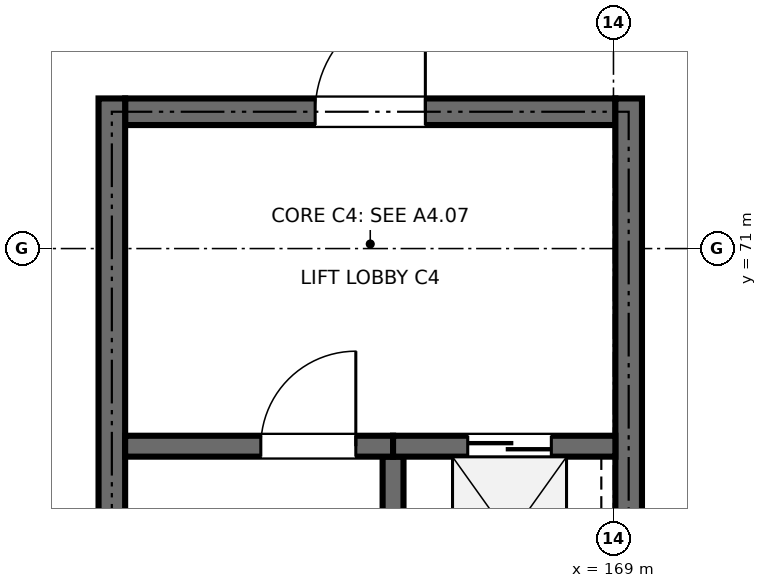
"""IFC4 building model, lengths in metres.
Left out: names, types, materials, properties, quantities, classifications, styles, units other than length and angle.
Written with IfcOpenShell. Run it as: python <this file> out.ifc"""

import sys

from ifc_helpers import new_model, si_unit, direction, frame, frame_2d, origin, place, context, subcontext, project, spatial, rectangle, extrude, element, fill, save


model = new_model("IFC4")
c1 = context("Model", 3, precision=1e-05, world=origin(), true_north=direction((0.0, 1.0)))
c2 = subcontext(c1, "Body", "Model", "MODEL_VIEW")
j1 = project(units=[si_unit("LENGTHUNIT", "METRE"), si_unit("PLANEANGLEUNIT", "RADIAN")], contexts=[c1])
p1 = place(None, origin())
s1 = spatial("IfcSite", under=j1, at=p1, CompositionType="ELEMENT")
p2 = place(p1, origin())
s2 = spatial("IfcBuilding", under=s1, at=p2, CompositionType="ELEMENT")
p3 = place(p2, frame((0.0, 0.0, 4.8)))
s3 = spatial("IfcBuildingStorey", under=s2, at=p3, CompositionType="ELEMENT", Elevation=4.8)
p4 = place(p3, frame((162.575, 72.8, 0.0), z_axis=(0.0, 0.0, 1.0), x_axis=(1.0, 0.0, 0.0)))
e1 = element("IfcWall", 1, at=p4, inside=s3, PredefinedType="SHEAR", context=c2, shape_type="SweptSolid", body=[
    extrude(rectangle(XDim=6.45, YDim=0.35, at=frame_2d((3.225, 0.0))), origin(), (0.0, 0.0, 1.0), 4.54),
])
p5 = place(p4, frame((2.5, 0.0, 0.0)))
e2 = element("IfcOpeningElement", 2, at=p5, cuts=e1, PredefinedType="OPENING", context=c2, shape_type="SweptSolid", body=[
    extrude(rectangle(XDim=1.45, YDim=2.2, at=frame_2d((0.725, 1.1))), frame((0.0, 0.185, 0.0), z_axis=(0.0, -1.0, 0.0), x_axis=(1.0, 0.0, 0.0)), (0.0, 0.0, 1.0), 0.37),
])
for number, where, z_axis, x_axis in (
    (3, (162.4, 61.375, 0.0), (0.0, 0.0, 1.0), (0.0, 1.0, 0.0)),
    (4, (169.2, 61.375, 0.0), (0.0, 0.0, 1.0), (0.0, 1.0, 0.0)),
):
    element("IfcWall", number, at=place(p3, frame(where, z_axis=z_axis, x_axis=x_axis)), inside=s3, PredefinedType="SHEAR", context=c2, shape_type="SweptSolid", body=[
        extrude(rectangle(XDim=11.6, YDim=0.35, at=frame_2d((5.8, 0.0))), origin(), (0.0, 0.0, 1.0), 4.54),
    ])
p6 = place(p3, frame((166.1, 61.375, 0.0), z_axis=(0.0, 0.0, 1.0), x_axis=(0.0, 1.0, 0.0)))
e5 = element("IfcWall", 5, at=p6, inside=s3, PredefinedType="SHEAR", context=c2, shape_type="SweptSolid", body=[
    extrude(rectangle(XDim=6.887, YDim=0.275, at=frame_2d((3.444, 0.0))), origin(), (0.0, 0.0, 1.0), 4.54),
])
p7 = place(p3, frame((162.575, 68.4, 0.0), z_axis=(0.0, 0.0, 1.0), x_axis=(1.0, 0.0, 0.0)))
e6 = element("IfcWall", 6, at=p7, inside=s3, PredefinedType="SHEAR", context=c2, shape_type="SweptSolid", body=[
    extrude(rectangle(XDim=3.525, YDim=0.275, at=frame_2d((1.763, 0.0))), origin(), (0.0, 0.0, 1.0), 4.54),
])
p8 = place(p7, frame((1.785, 0.0, 0.0)))
e7 = element("IfcOpeningElement", 7, at=p8, cuts=e6, PredefinedType="OPENING", context=c2, shape_type="SweptSolid", body=[
    extrude(rectangle(XDim=1.25, YDim=2.15, at=frame_2d((0.625, 1.075))), frame((0.0, 0.147, 0.0), z_axis=(0.0, -1.0, 0.0), x_axis=(1.0, 0.0, 0.0)), (0.0, 0.0, 1.0), 0.295),
])
p9 = place(p3, frame((166.1, 68.4, 0.0), z_axis=(0.0, 0.0, 1.0), x_axis=(1.0, 0.0, 0.0)))
e8 = element("IfcWall", 8, at=p9, inside=s3, PredefinedType="SHEAR", context=c2, shape_type="SweptSolid", body=[
    extrude(rectangle(XDim=2.925, YDim=0.275, at=frame_2d((1.462, 0.0))), origin(), (0.0, 0.0, 1.0), 4.54),
])
p10 = place(p9, frame((0.982, 0.0, 0.0)))
e9 = element("IfcOpeningElement", 9, at=p10, cuts=e8, PredefinedType="OPENING", context=c2, shape_type="SweptSolid", body=[
    extrude(rectangle(XDim=1.1, YDim=2.15, at=frame_2d((0.55, 1.075))), frame((0.0, 0.147, 0.0), z_axis=(0.0, -1.0, 0.0), x_axis=(1.0, 0.0, 0.0)), (0.0, 0.0, 1.0), 0.295),
])
p11 = place(p8, origin())
e10 = element("IfcDoor", 10, at=p11, inside=s3, OperationType="SINGLE_SWING_RIGHT", PredefinedType="DOOR", context=c2, shape_type="SweptSolid", body=[
    extrude(rectangle(XDim=1.25, YDim=2.15, at=frame_2d((0.625, 1.075))), frame((0.0, 0.025, 0.0), z_axis=(0.0, -1.0, 0.0), x_axis=(1.0, 0.0, 0.0)), (0.0, 0.0, 1.0), 0.05),
])
fill(e7, e10)
p12 = place(p10, origin())
e11 = element("IfcDoor", 11, at=p12, inside=s3, OperationType="DOUBLE_DOOR_SLIDING", PredefinedType="DOOR", context=c2, shape_type="SweptSolid", body=[
    extrude(rectangle(XDim=1.1, YDim=2.15, at=frame_2d((0.55, 1.075))), frame((0.0, 0.025, 0.0), z_axis=(0.0, -1.0, 0.0), x_axis=(1.0, 0.0, 0.0)), (0.0, 0.0, 1.0), 0.05),
])
fill(e9, e11)
p13 = place(p5, origin())
e12 = element("IfcDoor", 12, at=p13, inside=s3, OperationType="SINGLE_SWING_RIGHT", PredefinedType="DOOR", context=c2, shape_type="SweptSolid", body=[
    extrude(rectangle(XDim=1.45, YDim=2.2, at=frame_2d((0.725, 1.1))), frame((0.0, 0.025, 0.0), z_axis=(0.0, -1.0, 0.0), x_axis=(1.0, 0.0, 0.0)), (0.0, 0.0, 1.0), 0.05),
])
fill(e2, e12)
save(model, sys.argv[1])
